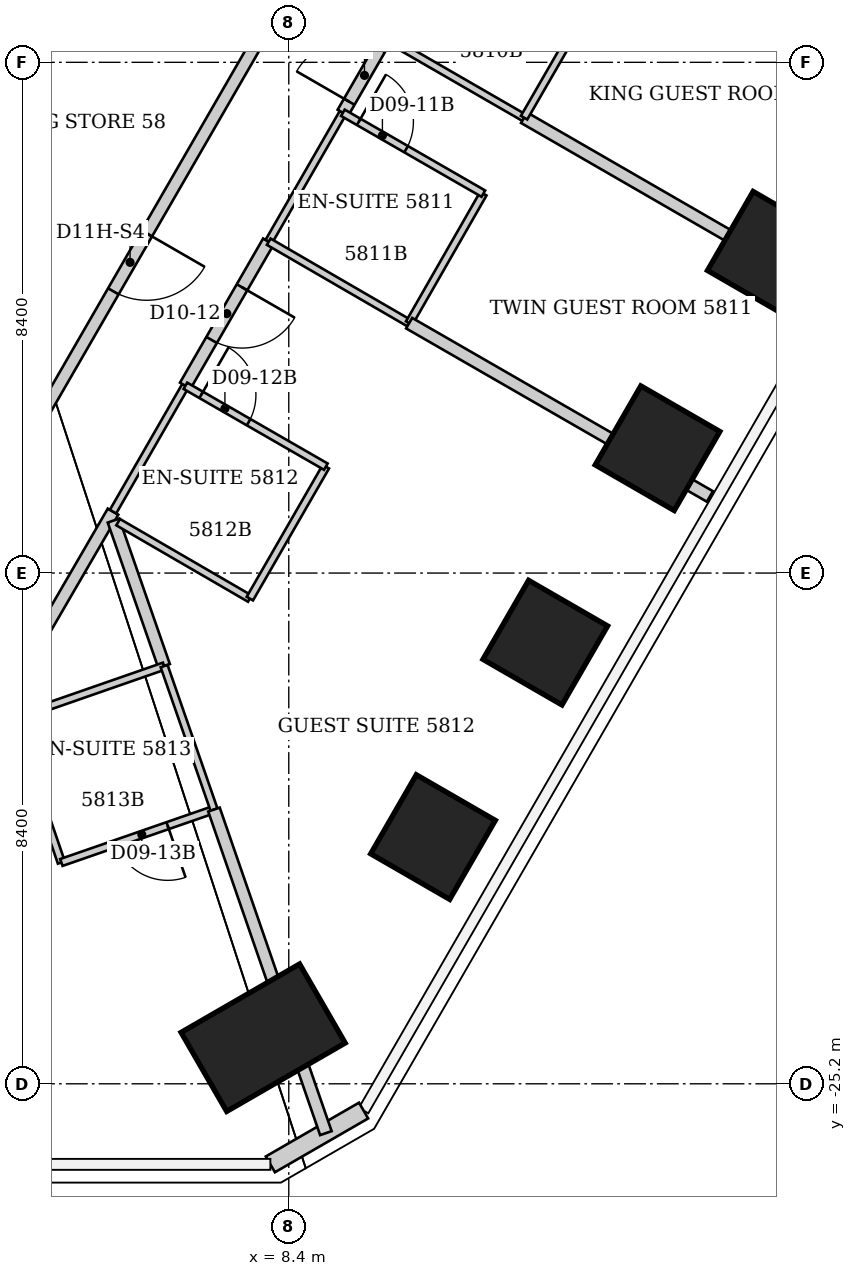
"""IFC4 building model, lengths in metres.
Left out: names, types, materials, properties, quantities, classifications, styles, units other than length and angle.
Written with IfcOpenShell. Run it as: python <this file> out.ifc"""

import sys

from ifc_helpers import new_model, si_unit, direction, frame, frame_2d, origin, origin_2d, place, context, subcontext, project, spatial, rectangle, extrude, element, fill, save


model = new_model("IFC4")
c1 = context("Model", 3, precision=1e-05, world=origin(), true_north=direction((0.0, 1.0)))
c2 = subcontext(c1, "Body", "Model", "MODEL_VIEW")
j1 = project(units=[si_unit("LENGTHUNIT", "METRE"), si_unit("PLANEANGLEUNIT", "RADIAN")], contexts=[c1])
p1 = place(None, origin())
s1 = spatial("IfcSite", under=j1, at=p1, CompositionType="ELEMENT")
p2 = place(p1, origin())
s2 = spatial("IfcBuilding", under=s1, at=p2, CompositionType="ELEMENT")
p3 = place(p2, frame((0.0, 0.0, 232.6)))
s3 = spatial("IfcBuildingStorey", under=s2, at=p3, CompositionType="ELEMENT", Elevation=232.6)
p4 = place(p3, frame((16.311, -11.549, -0.045), z_axis=(-0.04470040669, 0.03163901126, 0.99849929725), x_axis=(0.864958405461, -0.498872202327, 0.054529648515)))
e1 = element("IfcColumn", 1, at=p4, inside=s3, PredefinedType="COLUMN", context=c2, shape_type="SweptSolid", body=[
    extrude(rectangle(XDim=1.5, YDim=1.5, at=origin_2d()), origin(), (0.0, 0.0, 1.0), 3.851),
])
p5 = place(p3, frame((14.465, -14.747, -0.052), z_axis=(-0.039672557286, 0.040431840679, 0.998394388234), x_axis=(0.865239094384, -0.498381423107, 0.054564334973)))
e2 = element("IfcColumn", 2, at=p5, inside=s3, PredefinedType="COLUMN", context=c2, shape_type="SweptSolid", body=[
    extrude(rectangle(XDim=1.5, YDim=1.5, at=origin_2d()), origin(), (0.0, 0.0, 1.0), 3.858),
])
p6 = place(p3, frame((12.618, -17.945, -0.06), z_axis=(-0.034598880012, 0.049183444396, 0.998190315671), x_axis=(0.865519675904, -0.497897420706, 0.054533009053)))
e3 = element("IfcColumn", 3, at=p6, inside=s3, PredefinedType="COLUMN", context=c2, shape_type="SweptSolid", body=[
    extrude(rectangle(XDim=1.5, YDim=1.5, at=origin_2d()), origin(), (0.0, 0.0, 1.0), 3.867),
])
p7 = place(p3, frame((10.772, -21.142, -0.068), z_axis=(-0.029544009484, 0.057954133742, 0.997881991964), x_axis=(0.86581251094, -0.497389360855, 0.054520818106)))
e4 = element("IfcColumn", 4, at=p7, inside=s3, PredefinedType="COLUMN", context=c2, shape_type="SweptSolid", body=[
    extrude(rectangle(XDim=1.5, YDim=1.5, at=origin_2d()), origin(), (0.0, 0.0, 1.0), 3.876),
])
p8 = place(p3, frame((7.979, -24.442, -0.069), z_axis=(-0.022031779276, 0.067543140467, 0.997473069751), x_axis=(0.499490056896, -0.86352686909, 0.069505607122)))
e5 = element("IfcColumn", 5, at=p8, inside=s3, PredefinedType="COLUMN", context=c2, shape_type="SweptSolid", body=[
    extrude(rectangle(XDim=1.5, YDim=2.25, at=origin_2d()), origin(), (0.0, 0.0, 1.0), 3.878),
])
p9 = place(p3, frame((9.63, -25.64, 0.0), z_axis=(0.0, 0.0, 1.0), x_axis=(-0.866036293601, -0.499981137809, 0.0)))
e6 = element("IfcWall", 6, at=p9, inside=s3, PredefinedType="SOLIDWALL", context=c2, shape_type="SweptSolid", body=[
    extrude(rectangle(XDim=1.77, YDim=0.3, at=frame_2d((0.885, 0.0))), origin(), (0.0, 0.0, 1.0), 3.64),
])
p10 = place(p3, frame((3.85, -19.2, 0.0), z_axis=(0.0, 0.0, 1.0), x_axis=(0.324551952924, -0.945867871245, 0.0)))
e7 = element("IfcWall", 7, at=p10, inside=s3, PredefinedType="PARTITIONING", context=c2, shape_type="SweptSolid", body=[
    extrude(rectangle(XDim=2.495, YDim=0.12, at=frame_2d((1.248, 0.0))), origin(), (0.0, 0.0, 1.0), 3.64),
])
p11 = place(p3, frame((4.66, -21.56, 0.0), z_axis=(0.0, 0.0, 1.0), x_axis=(0.944838473769, 0.327536652126, 0.0)))
e8 = element("IfcWall", 8, at=p11, inside=s3, PredefinedType="PARTITIONING", context=c2, shape_type="SweptSolid", body=[
    extrude(rectangle(XDim=2.656, YDim=0.12, at=frame_2d((1.328, 0.0))), origin(), (0.0, 0.0, 1.0), 3.64),
])
p12 = place(p11, frame((0.95, 0.0, 0.0)))
e9 = element("IfcOpeningElement", 9, at=p12, cuts=e8, PredefinedType="OPENING", context=c2, shape_type="SweptSolid", body=[
    extrude(rectangle(XDim=0.9, YDim=2.03, at=frame_2d((0.45, 1.015))), frame((0.0, 0.06, 0.0), z_axis=(0.0, -1.0, 0.0), x_axis=(1.0, 0.0, 0.0)), (0.0, 0.0, 1.0), 0.12),
])
p13 = place(p3, frame((5.51, -15.79, 0.0), z_axis=(0.0, 0.0, 1.0), x_axis=(-0.501964949025, -0.864887963814, 0.0)))
e10 = element("IfcWall", 10, at=p13, inside=s3, PredefinedType="PARTITIONING", context=c2, shape_type="SweptSolid", body=[
    extrude(rectangle(XDim=2.59, YDim=0.2, at=frame_2d((1.295, 0.0))), origin(), (0.0, 0.0, 1.0), 3.64),
])
p14 = place(p3, frame((5.51, -15.79, 0.0), z_axis=(0.0, 0.0, 1.0), x_axis=(0.49836161924, 0.866969259241, 0.0)))
e11 = element("IfcWall", 11, at=p14, inside=s3, PredefinedType="PARTITIONING", context=c2, shape_type="SweptSolid", body=[
    extrude(rectangle(XDim=2.388, YDim=0.12, at=frame_2d((1.194, 0.0))), origin(), (0.0, 0.0, 1.0), 3.64),
])
p15 = place(p3, frame((5.517, -15.937, 0.0), z_axis=(0.0, 0.0, 1.0), x_axis=(0.328714924291, -0.944429191919, 0.0)))
e12 = element("IfcWall", 12, at=p15, inside=s3, PredefinedType="PARTITIONING", context=c2, shape_type="SweptSolid", body=[
    extrude(rectangle(XDim=2.534, YDim=0.2, at=frame_2d((1.267, 0.0))), origin(), (0.0, 0.0, 1.0), 3.64),
])
p16 = place(p3, frame((5.594, -15.963, 0.0), z_axis=(0.0, 0.0, 1.0), x_axis=(0.864900876675, -0.501942699445, 0.0)))
e13 = element("IfcWall", 13, at=p16, inside=s3, PredefinedType="PARTITIONING", context=c2, shape_type="SweptSolid", body=[
    extrude(rectangle(XDim=2.505, YDim=0.12, at=frame_2d((1.252, 0.0))), origin(), (0.0, 0.0, 1.0), 3.038),
])
p17 = place(p3, frame((6.35, -18.33, 0.0), z_axis=(0.0, 0.0, 1.0), x_axis=(-0.944470666048, -0.328595740956, 0.0)))
e14 = element("IfcWall", 14, at=p17, inside=s3, PredefinedType="PARTITIONING", context=c2, shape_type="SweptSolid", body=[
    extrude(rectangle(XDim=2.647, YDim=0.12, at=frame_2d((1.324, 0.0))), origin(), (0.0, 0.0, 1.0), 3.64),
])
p18 = place(p3, frame((6.35, -18.33, 0.0), z_axis=(0.0, 0.0, 1.0), x_axis=(0.328164304993, -0.944620658745, 0.0)))
e15 = element("IfcWall", 15, at=p18, inside=s3, PredefinedType="PARTITIONING", context=c2, shape_type="SweptSolid", body=[
    extrude(rectangle(XDim=2.498, YDim=0.12, at=frame_2d((1.249, 0.0))), origin(), (0.0, 0.0, 1.0), 3.64),
])
p19 = place(p3, frame((7.17, -20.69, 0.0), z_axis=(0.0, 0.0, 1.0), x_axis=(0.326821657676, -0.945086029985, 0.0)))
e16 = element("IfcWall", 16, at=p19, inside=s3, PredefinedType="PARTITIONING", context=c2, shape_type="SweptSolid", body=[
    extrude(rectangle(XDim=5.631, YDim=0.2, at=frame_2d((2.815, 0.0))), origin(), (0.0, 0.0, 1.0), 3.64),
])
p20 = place(p3, frame((7.76, -17.22, 0.0), z_axis=(0.0, 0.0, 1.0), x_axis=(0.499159685399, 0.866510016372, 0.0)))
e17 = element("IfcWall", 17, at=p20, inside=s3, PredefinedType="PARTITIONING", context=c2, shape_type="SweptSolid", body=[
    extrude(rectangle(XDim=2.504, YDim=0.12, at=frame_2d((1.252, 0.0))), origin(), (0.0, 0.0, 1.0), 3.64),
])
p21 = place(p3, frame((8.065, -11.347, 0.0), z_axis=(0.0, 0.0, 1.0), x_axis=(-0.499611785355, -0.866249423627, 0.0)))
e18 = element("IfcWall", 18, at=p21, inside=s3, PredefinedType="PARTITIONING", context=c2, shape_type="SweptSolid", body=[
    extrude(rectangle(XDim=2.738, YDim=0.2, at=frame_2d((1.369, 0.0))), origin(), (0.0, 0.0, 1.0), 3.64),
])
p22 = place(p21, frame((0.869, 0.0, 0.0)))
e19 = element("IfcOpeningElement", 19, at=p22, cuts=e18, PredefinedType="OPENING", context=c2, shape_type="SweptSolid", body=[
    extrude(rectangle(XDim=1.0, YDim=2.13, at=frame_2d((0.5, 1.065))), frame((0.0, 0.1, 0.0), z_axis=(0.0, -1.0, 0.0), x_axis=(1.0, 0.0, 0.0)), (0.0, 0.0, 1.0), 0.2),
])
p23 = place(p3, frame((8.07, -11.35, 0.0), z_axis=(0.0, 0.0, 1.0), x_axis=(0.498748634132, 0.866746675766, 0.0)))
e20 = element("IfcWall", 20, at=p23, inside=s3, PredefinedType="PARTITIONING", context=c2, shape_type="SweptSolid", body=[
    extrude(rectangle(XDim=2.446, YDim=0.12, at=frame_2d((1.223, 0.0))), origin(), (0.0, 0.0, 1.0), 3.64),
])
p24 = place(p3, frame((8.07, -11.35, 0.0), z_axis=(0.0, 0.0, 1.0), x_axis=(0.865006586495, -0.501760505939, 0.0)))
e21 = element("IfcWall", 21, at=p24, inside=s3, PredefinedType="PARTITIONING", context=c2, shape_type="SweptSolid", body=[
    extrude(rectangle(XDim=2.67, YDim=0.12, at=frame_2d((1.335, 0.0))), origin(), (0.0, 0.0, 1.0), 3.64),
])
p25 = place(p3, frame((8.41, -7.15, 0.0), z_axis=(0.0, 0.0, 1.0), x_axis=(-0.499828628176, -0.866124322748, 0.0)))
e22 = element("IfcWall", 22, at=p25, inside=s3, PredefinedType="PARTITIONING", context=c2, shape_type="SweptSolid", body=[
    extrude(rectangle(XDim=10.484, YDim=0.2, at=frame_2d((5.242, 0.0))), origin(), (0.0, 0.0, 1.0), 3.64),
])
p26 = place(p25, frame((4.692, 0.0, 0.0)))
e23 = element("IfcOpeningElement", 23, at=p26, cuts=e22, PredefinedType="OPENING", context=c2, shape_type="SweptSolid", body=[
    extrude(rectangle(XDim=1.1, YDim=2.2, at=frame_2d((0.55, 1.1))), frame((0.0, 0.1, 0.0), z_axis=(0.0, -1.0, 0.0), x_axis=(1.0, 0.0, 0.0)), (0.0, 0.0, 1.0), 0.2),
])
p27 = place(p3, frame((9.01, -15.05, 0.0), z_axis=(0.0, 0.0, 1.0), x_axis=(-0.866615255992, 0.498976951453, 0.0)))
e24 = element("IfcWall", 24, at=p27, inside=s3, PredefinedType="PARTITIONING", context=c2, shape_type="SweptSolid", body=[
    extrude(rectangle(XDim=2.666, YDim=0.12, at=frame_2d((1.333, 0.0))), origin(), (0.0, 0.0, 1.0), 3.64),
])
p28 = place(p27, frame((1.466, 0.0, 0.0)))
e25 = element("IfcOpeningElement", 25, at=p28, cuts=e24, PredefinedType="OPENING", context=c2, shape_type="SweptSolid", body=[
    extrude(rectangle(XDim=0.9, YDim=2.03, at=frame_2d((0.45, 1.015))), frame((0.0, 0.06, 0.0), z_axis=(0.0, -1.0, 0.0), x_axis=(1.0, 0.0, 0.0)), (0.0, 0.0, 1.0), 0.12),
])
p29 = place(p3, frame((9.29, -9.23, 0.0), z_axis=(0.0, 0.0, 1.0), x_axis=(0.499910949922, 0.866076810767, 0.0)))
e26 = element("IfcWall", 26, at=p29, inside=s3, PredefinedType="PARTITIONING", context=c2, shape_type="SweptSolid", body=[
    extrude(rectangle(XDim=1.42, YDim=0.2, at=frame_2d((0.71, 0.0))), origin(), (0.0, 0.0, 1.0), 3.64),
])
p30 = place(p29, frame((0.21, 0.0, 0.0)))
e27 = element("IfcOpeningElement", 27, at=p30, cuts=e26, PredefinedType="OPENING", context=c2, shape_type="SweptSolid", body=[
    extrude(rectangle(XDim=1.0, YDim=2.13, at=frame_2d((0.5, 1.065))), frame((0.0, 0.1, 0.0), z_axis=(0.0, -1.0, 0.0), x_axis=(1.0, 0.0, 0.0)), (0.0, 0.0, 1.0), 0.2),
])
p31 = place(p3, frame((10.0, -8.0, 0.0), z_axis=(0.0, 0.0, 1.0), x_axis=(0.866010296064, -0.500026166427, 0.0)))
e28 = element("IfcWall", 28, at=p31, inside=s3, PredefinedType="PARTITIONING", context=c2, shape_type="SweptSolid", body=[
    extrude(rectangle(XDim=2.621, YDim=0.12, at=frame_2d((1.311, 0.0))), origin(), (0.0, 0.0, 1.0), 3.64),
])
p32 = place(p3, frame((10.38, -12.69, 0.0), z_axis=(0.0, 0.0, 1.0), x_axis=(0.497102632485, 0.867691749861, 0.0)))
e29 = element("IfcWall", 29, at=p32, inside=s3, PredefinedType="PARTITIONING", context=c2, shape_type="SweptSolid", body=[
    extrude(rectangle(XDim=2.455, YDim=0.12, at=frame_2d((1.227, 0.0))), origin(), (0.0, 0.0, 1.0), 3.64),
])
p33 = place(p3, frame((10.38, -12.69, 0.0), z_axis=(0.0, 0.0, 1.0), x_axis=(0.866442508333, -0.499276856818, 0.0)))
e30 = element("IfcWall", 30, at=p33, inside=s3, PredefinedType="PARTITIONING", context=c2, shape_type="SweptSolid", body=[
    extrude(rectangle(XDim=5.708, YDim=0.2, at=frame_2d((2.854, 0.0))), origin(), (0.0, 0.0, 1.0), 3.64),
])
p34 = place(p3, frame((11.6, -10.56, 0.0), z_axis=(0.0, 0.0, 1.0), x_axis=(-0.866615255992, 0.498976951453, 0.0)))
e31 = element("IfcWall", 31, at=p34, inside=s3, PredefinedType="PARTITIONING", context=c2, shape_type="SweptSolid", body=[
    extrude(rectangle(XDim=2.666, YDim=0.12, at=frame_2d((1.333, 0.0))), origin(), (0.0, 0.0, 1.0), 3.64),
])
p35 = place(p34, frame((1.466, 0.0, 0.0)))
e32 = element("IfcOpeningElement", 32, at=p35, cuts=e31, PredefinedType="OPENING", context=c2, shape_type="SweptSolid", body=[
    extrude(rectangle(XDim=0.9, YDim=2.03, at=frame_2d((0.45, 1.015))), frame((0.0, 0.06, 0.0), z_axis=(0.0, -1.0, 0.0), x_axis=(1.0, 0.0, 0.0)), (0.0, 0.0, 1.0), 0.12),
])
p36 = place(p3, frame((12.27, -9.311, 0.0), z_axis=(0.0, 0.0, 1.0), x_axis=(0.865985044037, -0.500069898618, 0.0)))
e33 = element("IfcWall", 33, at=p36, inside=s3, PredefinedType="PARTITIONING", context=c2, shape_type="SweptSolid", body=[
    extrude(rectangle(XDim=5.758, YDim=0.2, at=frame_2d((2.879, 0.0))), origin(), (0.0, 0.0, 1.0), 3.64),
])
p37 = place(p3, frame((12.27, -9.31, 0.0), z_axis=(0.0, 0.0, 1.0), x_axis=(0.499693115345, 0.866202511239, 0.0)))
e34 = element("IfcWall", 34, at=p37, inside=s3, PredefinedType="PARTITIONING", context=c2, shape_type="SweptSolid", body=[
    extrude(rectangle(XDim=2.401, YDim=0.12, at=frame_2d((1.201, 0.0))), origin(), (0.0, 0.0, 1.0), 3.64),
])
p38 = place(p3, frame((14.2, -5.971, 0.0), z_axis=(0.0, 0.0, 1.0), x_axis=(0.86600340545, -0.500038100297, 0.0)))
e35 = element("IfcWall", 35, at=p38, inside=s3, PredefinedType="PARTITIONING", context=c2, shape_type="SweptSolid", body=[
    extrude(rectangle(XDim=5.758, YDim=0.2, at=frame_2d((2.879, 0.0))), origin(), (0.0, 0.0, 1.0), 3.64),
])
p39 = place(p30, origin())
e36 = element("IfcDoor", 36, at=p39, inside=s3, OperationType="SINGLE_SWING_LEFT", PredefinedType="DOOR", context=c2, shape_type="SweptSolid", body=[
    extrude(rectangle(XDim=1.0, YDim=2.13, at=frame_2d((0.5, 1.065))), frame((0.0, 0.025, 0.0), z_axis=(0.0, -1.0, 0.0), x_axis=(1.0, 0.0, 0.0)), (0.0, 0.0, 1.0), 0.05),
])
fill(e27, e36)
p40 = place(p35, origin())
e37 = element("IfcDoor", 37, at=p40, inside=s3, OperationType="SINGLE_SWING_RIGHT", PredefinedType="DOOR", context=c2, shape_type="SweptSolid", body=[
    extrude(rectangle(XDim=0.9, YDim=2.03, at=frame_2d((0.45, 1.015))), frame((0.0, 0.025, 0.0), z_axis=(0.0, -1.0, 0.0), x_axis=(1.0, 0.0, 0.0)), (0.0, 0.0, 1.0), 0.05),
])
fill(e32, e37)
p41 = place(p22, origin())
e38 = element("IfcDoor", 38, at=p41, inside=s3, OperationType="SINGLE_SWING_LEFT", PredefinedType="DOOR", context=c2, shape_type="SweptSolid", body=[
    extrude(rectangle(XDim=1.0, YDim=2.13, at=frame_2d((0.5, 1.065))), frame((0.0, 0.025, 0.0), z_axis=(0.0, -1.0, 0.0), x_axis=(1.0, 0.0, 0.0)), (0.0, 0.0, 1.0), 0.05),
])
fill(e19, e38)
p42 = place(p28, origin())
e39 = element("IfcDoor", 39, at=p42, inside=s3, OperationType="SINGLE_SWING_RIGHT", PredefinedType="DOOR", context=c2, shape_type="SweptSolid", body=[
    extrude(rectangle(XDim=0.9, YDim=2.03, at=frame_2d((0.45, 1.015))), frame((0.0, 0.025, 0.0), z_axis=(0.0, -1.0, 0.0), x_axis=(1.0, 0.0, 0.0)), (0.0, 0.0, 1.0), 0.05),
])
fill(e25, e39)
p43 = place(p12, origin())
e40 = element("IfcDoor", 40, at=p43, inside=s3, OperationType="SINGLE_SWING_RIGHT", PredefinedType="DOOR", context=c2, shape_type="SweptSolid", body=[
    extrude(rectangle(XDim=0.9, YDim=2.03, at=frame_2d((0.45, 1.015))), frame((0.0, 0.025, 0.0), z_axis=(0.0, -1.0, 0.0), x_axis=(1.0, 0.0, 0.0)), (0.0, 0.0, 1.0), 0.05),
])
fill(e9, e40)
p44 = place(p26, origin())
e41 = element("IfcDoor", 41, at=p44, inside=s3, OperationType="SINGLE_SWING_LEFT", PredefinedType="DOOR", context=c2, shape_type="SweptSolid", body=[
    extrude(rectangle(XDim=1.1, YDim=2.2, at=frame_2d((0.55, 1.1))), frame((0.0, 0.025, 0.0), z_axis=(0.0, -1.0, 0.0), x_axis=(1.0, 0.0, 0.0)), (0.0, 0.0, 1.0), 0.05),
])
fill(e23, e41)
save(model, sys.argv[1])
